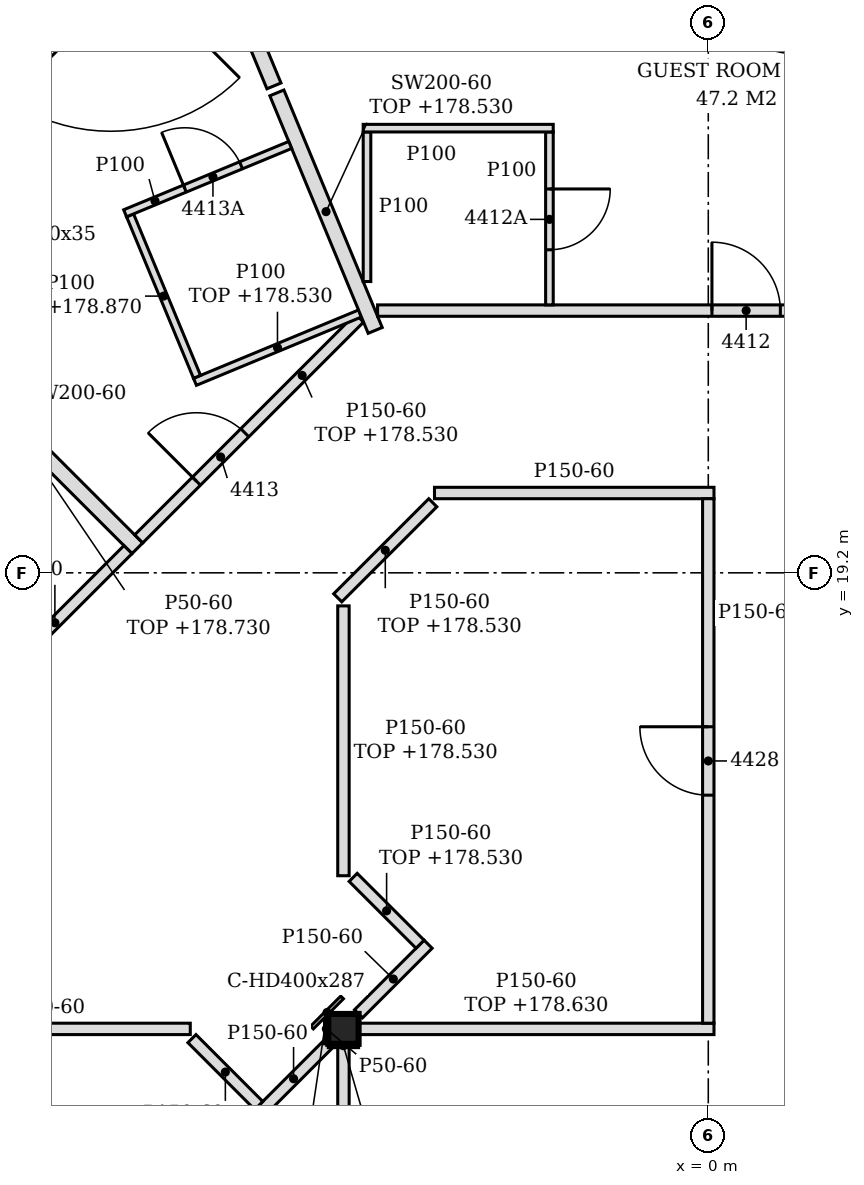
"""IFC4 building model, lengths in metres.
Left out: names, types, materials, properties, quantities, classifications, styles, units other than length and angle.
Written with IfcOpenShell. Run it as: python <this file> out.ifc"""

import sys

from ifc_helpers import new_model, si_unit, direction, frame, frame_2d, origin, origin_2d, place, context, subcontext, project, spatial, polyline, rectangle, i_section, outline, extrude, element, fill, save


model = new_model("IFC4")
c1 = context("Model", 3, precision=1e-05, world=origin(), true_north=direction((0.0, 1.0)))
c2 = subcontext(c1, "Body", "Model", "MODEL_VIEW")
j1 = project(units=[si_unit("LENGTHUNIT", "METRE"), si_unit("PLANEANGLEUNIT", "RADIAN")], contexts=[c1])
p1 = place(None, origin())
s1 = spatial("IfcSite", under=j1, at=p1, CompositionType="ELEMENT")
p2 = place(p1, origin())
s2 = spatial("IfcBuilding", under=s1, at=p2, CompositionType="ELEMENT")
p3 = place(p2, frame((0.0, 0.0, 175.8)))
s3 = spatial("IfcBuildingStorey", under=s2, at=p3, CompositionType="ELEMENT", Elevation=175.8)
p4 = place(p3, frame((-4.8, 13.2, -0.15), z_axis=(0.0, 0.0, 1.0), x_axis=(1.0, 0.0, 0.0)))
e1 = element("IfcColumn", 1, at=p4, inside=s3, PredefinedType="COLUMN", context=c2, shape_type="SweptSolid", body=[
    extrude(i_section(OverallWidth=0.399, OverallDepth=0.393, WebThickness=0.023, FlangeThickness=0.037, FilletRadius=0.015, at=origin_2d()), origin(), (0.0, 0.0, 1.0), 3.6),
])
p5 = place(p3, frame((-6.9, 28.372, 0.0), z_axis=(0.0, 0.0, 1.0), x_axis=(-0.707106781187, -0.707106781187, 0.0)))
e2 = element("IfcWall", 2, at=p5, inside=s3, PredefinedType="NOTDEFINED", context=c2, shape_type="SweptSolid", body=[
    extrude(rectangle(XDim=3.962, YDim=0.2, at=frame_2d((1.981, 0.0))), origin(), (0.0, 0.0, 1.0), 3.45),
])
p6 = place(p5, frame((1.362, 0.0, 0.0)))
e3 = element("IfcOpeningElement", 3, at=p6, cuts=e2, PredefinedType="OPENING", context=c2, shape_type="SweptSolid", body=[
    extrude(rectangle(XDim=2.4, YDim=2.4, at=frame_2d((1.2, 1.2))), frame((0.0, 0.11, 0.0), z_axis=(0.0, -1.0, 0.0), x_axis=(1.0, 0.0, 0.0)), (0.0, 0.0, 1.0), 0.22),
])
p7 = place(p3, frame((-4.8, 2.596, 0.0), z_axis=(0.0, 0.0, 1.0), x_axis=(0.0, 1.0, 0.0)))
e4 = element("IfcWall", 4, at=p7, inside=s3, PredefinedType="PARTITIONING", context=c2, shape_type="SweptSolid", body=[
    extrude(rectangle(XDim=10.407, YDim=0.15, at=frame_2d((5.204, 0.0))), origin(), (0.0, 0.0, 1.0), 2.83),
])
p8 = place(p7, frame((2.954, 0.0, 0.0)))
e5 = element("IfcOpeningElement", 5, at=p8, cuts=e4, PredefinedType="OPENING", context=c2, shape_type="SweptSolid", body=[
    extrude(rectangle(XDim=0.9, YDim=2.1, at=frame_2d((0.45, 1.05))), frame((0.0, 0.085, 0.0), z_axis=(0.0, -1.0, 0.0), x_axis=(1.0, 0.0, 0.0)), (0.0, 0.0, 1.0), 0.17),
])
p9 = place(p3, frame((-5.914, 12.086, 0.0), z_axis=(0.0, 0.0, 1.0), x_axis=(0.707106781187, 0.707106781187, 0.0)))
e6 = element("IfcWall", 6, at=p9, inside=s3, PredefinedType="PARTITIONING", context=c2, shape_type="SweptSolid", body=[
    extrude(rectangle(XDim=1.295, YDim=0.15, at=frame_2d((0.648, 0.0))), origin(), (0.0, 0.0, 1.0), 3.45),
])
p10 = place(p3, frame((-5.914, 12.192, 0.0), z_axis=(0.0, 0.0, 1.0), x_axis=(-0.706812296552, 0.70740114323, 0.0)))
e7 = element("IfcWall", 7, at=p10, inside=s3, PredefinedType="PARTITIONING", context=c2, shape_type="SweptSolid", body=[
    extrude(rectangle(XDim=1.244, YDim=0.15, at=frame_2d((0.622, 0.0))), origin(), (0.0, 0.0, 1.0), 3.45),
])
p11 = place(p3, frame((-10.652, 13.2, 0.0), z_axis=(0.0, 0.0, 1.0), x_axis=(1.0, 0.0, 0.0)))
e8 = element("IfcWall", 8, at=p11, inside=s3, PredefinedType="PARTITIONING", context=c2, shape_type="SweptSolid", body=[
    extrude(rectangle(XDim=3.837, YDim=0.15, at=frame_2d((1.918, 0.0))), origin(), (0.0, 0.0, 1.0), 3.45),
])
p12 = place(p3, frame((-4.601, 13.2, 0.0), z_axis=(0.0, 0.0, 1.0), x_axis=(1.0, 0.0, 0.0)))
e9 = element("IfcWall", 9, at=p12, inside=s3, PredefinedType="PARTITIONING", context=c2, shape_type="SweptSolid", body=[
    extrude(rectangle(XDim=4.676, YDim=0.15, at=frame_2d((2.338, 0.0))), origin(), (0.0, 0.0, 1.0), 2.83),
])
p13 = place(p3, frame((0.0, 13.275, 0.0), z_axis=(0.0, 0.0, 1.0), x_axis=(0.0, 1.0, 0.0)))
e10 = element("IfcWall", 10, at=p13, inside=s3, PredefinedType="PARTITIONING", context=c2, shape_type="SweptSolid", body=[
    extrude(outline(polyline([(0.0, 0.0), (6.9, 0.0), (6.9, 3.45), (5.43, 3.45), (5.428, 2.88), (5.22, 2.88), (5.218, 3.45), (0.075, 3.45), (0.073, 2.83), (0.0, 2.83), (0.0, 0.0)])), frame((0.0, 0.075, 0.0), z_axis=(0.0, -1.0, 0.0), x_axis=(1.0, 0.0, 0.0)), (0.0, 0.0, 1.0), 0.15),
])
p14 = place(p13, frame((3.0, 0.0, 0.0)))
e11 = element("IfcOpeningElement", 11, at=p14, cuts=e10, PredefinedType="OPENING", context=c2, shape_type="SweptSolid", body=[
    extrude(rectangle(XDim=0.9, YDim=2.1, at=frame_2d((0.45, 1.05))), frame((0.0, 0.085, 0.0), z_axis=(0.0, -1.0, 0.0), x_axis=(1.0, 0.0, 0.0)), (0.0, 0.0, 1.0), 0.17),
])
p15 = place(p3, frame((-4.602, 13.398, 0.0), z_axis=(0.0, 0.0, 1.0), x_axis=(0.707106781187, 0.707106781187, 0.0)))
e12 = element("IfcWall", 12, at=p15, inside=s3, PredefinedType="PARTITIONING", context=c2, shape_type="SweptSolid", body=[
    extrude(rectangle(XDim=1.296, YDim=0.15, at=frame_2d((0.648, 0.0))), origin(), (0.0, 0.0, 1.0), 3.45),
])
p16 = place(p3, frame((-3.792, 14.314, 0.0), z_axis=(0.0, 0.0, 1.0), x_axis=(-0.707499182195, 0.706714162298, 0.0)))
e13 = element("IfcWall", 13, at=p16, inside=s3, PredefinedType="PARTITIONING", context=c2, shape_type="SweptSolid", body=[
    extrude(rectangle(XDim=1.244, YDim=0.15, at=frame_2d((0.622, 0.0))), origin(), (0.0, 0.0, 1.0), 2.73),
])
p17 = place(p3, frame((-12.117, 15.022, 0.0), z_axis=(0.0, 0.0, 1.0), x_axis=(0.70701050414, 0.707203045127, 0.0)))
e14 = element("IfcWall", 14, at=p17, inside=s3, PredefinedType="PARTITIONING", context=c2, shape_type="SweptSolid", body=[
    extrude(rectangle(XDim=6.34, YDim=0.15, at=frame_2d((3.17, 0.0))), origin(), (0.0, 0.0, 1.0), 2.93),
])
p18 = place(p17, frame((2.72, 0.0, 0.0)))
e15 = element("IfcOpeningElement", 15, at=p18, cuts=e14, PredefinedType="OPENING", context=c2, shape_type="SweptSolid", body=[
    extrude(rectangle(XDim=0.9, YDim=2.1, at=frame_2d((0.45, 1.05))), frame((0.0, 0.085, 0.0), z_axis=(0.0, -1.0, 0.0), x_axis=(1.0, 0.0, 0.0)), (0.0, 0.0, 1.0), 0.17),
])
p19 = place(p3, frame((-4.8, 15.215, 0.0), z_axis=(0.0, 0.0, 1.0), x_axis=(0.0, 1.0, 0.0)))
e16 = element("IfcWall", 16, at=p19, inside=s3, PredefinedType="PARTITIONING", context=c2, shape_type="SweptSolid", body=[
    extrude(rectangle(XDim=3.55, YDim=0.15, at=frame_2d((1.775, 0.0))), origin(), (0.0, 0.0, 1.0), 2.73),
])
p20 = place(p3, frame((-4.875, 18.871, 0.0), z_axis=(0.0, 0.0, 1.0), x_axis=(0.707175784043, 0.707037771595, 0.0)))
e17 = element("IfcWall", 17, at=p20, inside=s3, PredefinedType="PARTITIONING", context=c2, shape_type="SweptSolid", body=[
    extrude(rectangle(XDim=1.769, YDim=0.15, at=frame_2d((0.885, 0.0))), origin(), (0.0, 0.0, 1.0), 2.73),
])
p21 = place(p3, frame((-7.511, 19.523, 0.0), z_axis=(0.0, 0.0, 1.0), x_axis=(-0.707167526582, 0.707046030572, 0.0)))
e18 = element("IfcWall", 18, at=p21, inside=s3, PredefinedType="PARTITIONING", context=c2, shape_type="SweptSolid", body=[
    extrude(rectangle(XDim=4.019, YDim=0.2, at=frame_2d((2.009, 0.0))), origin(), (0.0, 0.0, 1.0), 3.45),
])
p22 = place(p3, frame((-7.493, 19.647, 0.0), z_axis=(0.0, 0.0, 1.0), x_axis=(0.707136494677, 0.707077066448, 0.0)))
e19 = element("IfcWall", 19, at=p22, inside=s3, PredefinedType="PARTITIONING", context=c2, shape_type="SweptSolid", body=[
    extrude(rectangle(XDim=4.108, YDim=0.15, at=frame_2d((2.054, 0.0))), origin(), (0.0, 0.0, 1.0), 2.73),
])
p23 = place(p22, frame((1.074, 0.0, 0.0)))
e20 = element("IfcOpeningElement", 20, at=p23, cuts=e19, PredefinedType="OPENING", context=c2, shape_type="SweptSolid", body=[
    extrude(rectangle(XDim=0.9, YDim=2.1, at=frame_2d((0.45, 1.05))), frame((0.0, 0.085, 0.0), z_axis=(0.0, -1.0, 0.0), x_axis=(1.0, 0.0, 0.0)), (0.0, 0.0, 1.0), 0.17),
])
p24 = place(p3, frame((-3.602, 20.25, 0.0), z_axis=(0.0, 0.0, 1.0), x_axis=(1.0, 0.0, 0.0)))
e21 = element("IfcWall", 21, at=p24, inside=s3, PredefinedType="PARTITIONING", context=c2, shape_type="SweptSolid", body=[
    extrude(rectangle(XDim=3.677, YDim=0.15, at=frame_2d((1.838, 0.0))), origin(), (0.0, 0.0, 1.0), 3.45),
])
p25 = place(p3, frame((-6.753, 21.713, 0.0), z_axis=(0.0, 0.0, 1.0), x_axis=(0.923907921622, 0.382614887798, 0.0)))
e22 = element("IfcWall", 22, at=p25, inside=s3, PredefinedType="PARTITIONING", context=c2, shape_type="SweptSolid", body=[
    extrude(rectangle(XDim=2.349, YDim=0.1, at=frame_2d((1.175, 0.0))), origin(), (0.0, 0.0, 1.0), 2.73),
])
p26 = place(p3, frame((-6.726, 21.778, 0.0), z_axis=(0.0, 0.0, 1.0), x_axis=(-0.382911179632, 0.923785163614, 0.0)))
e23 = element("IfcWall", 23, at=p26, inside=s3, PredefinedType="PARTITIONING", context=c2, shape_type="SweptSolid", body=[
    extrude(rectangle(XDim=2.3, YDim=0.1, at=frame_2d((1.15, 0.0))), origin(), (0.0, 0.0, 1.0), 3.07),
])
p27 = place(p3, frame((-4.382, 22.389, 0.0), z_axis=(0.0, 0.0, 1.0), x_axis=(-0.382553705703, 0.923933256384, 0.0)))
e24 = element("IfcWall", 24, at=p27, inside=s3, PredefinedType="PARTITIONING", context=c2, shape_type="SweptSolid", body=[
    extrude(rectangle(XDim=3.382, YDim=0.2, at=frame_2d((1.691, 0.0))), origin(), (0.0, 0.0, 1.0), 2.73),
])
p28 = place(p3, frame((-4.351, 22.65, 0.0), z_axis=(0.0, 0.0, 1.0), x_axis=(1.0, 0.0, 0.0)))
e25 = element("IfcWall", 25, at=p28, inside=s3, PredefinedType="PARTITIONING", context=c2, shape_type="SweptSolid", body=[
    extrude(outline(polyline([(0.0, 0.0), (23.551, 0.0), (23.552, 2.73), (23.401, 2.73), (23.399, 3.45), (11.701, 3.45), (11.699, 2.73), (11.401, 2.73), (11.399, 3.45), (0.0, 3.45), (0.0, 0.0)])), frame((0.0, 0.075, 0.0), z_axis=(0.0, -1.0, 0.0), x_axis=(1.0, 0.0, 0.0)), (0.0, 0.0, 1.0), 0.15),
])
p29 = place(p28, frame((20.99, 0.0, 0.0)))
e26 = element("IfcOpeningElement", 26, at=p29, cuts=e25, PredefinedType="OPENING", context=c2, shape_type="SweptSolid", body=[
    extrude(rectangle(XDim=0.9, YDim=2.1, at=frame_2d((0.45, 1.05))), frame((0.0, 0.085, 0.0), z_axis=(0.0, -1.0, 0.0), x_axis=(1.0, 0.0, 0.0)), (0.0, 0.0, 1.0), 0.17),
])
p30 = place(p28, frame((11.664, 0.0, 0.0)))
e27 = element("IfcOpeningElement", 27, at=p30, cuts=e25, PredefinedType="OPENING", context=c2, shape_type="SweptSolid", body=[
    extrude(rectangle(XDim=0.9, YDim=2.1, at=frame_2d((0.45, 1.05))), frame((0.0, 0.085, 0.0), z_axis=(0.0, -1.0, 0.0), x_axis=(1.0, 0.0, 0.0)), (0.0, 0.0, 1.0), 0.17),
])
p31 = place(p28, frame((4.399, 0.0, 0.0)))
e28 = element("IfcOpeningElement", 28, at=p31, cuts=e25, PredefinedType="OPENING", context=c2, shape_type="SweptSolid", body=[
    extrude(rectangle(XDim=0.9, YDim=2.1, at=frame_2d((0.45, 1.05))), frame((0.0, 0.085, 0.0), z_axis=(0.0, -1.0, 0.0), x_axis=(1.0, 0.0, 0.0)), (0.0, 0.0, 1.0), 0.17),
])
p32 = place(p3, frame((-2.09, 22.725, 0.0), z_axis=(0.0, 0.0, 1.0), x_axis=(0.0, 1.0, 0.0)))
e29 = element("IfcWall", 29, at=p32, inside=s3, PredefinedType="PARTITIONING", context=c2, shape_type="SweptSolid", body=[
    extrude(outline(polyline([(0.0, 0.0), (2.275, 0.0), (2.275, 3.45), (0.78, 3.45), (0.778, 2.88), (0.57, 2.88), (0.568, 3.45), (0.0, 3.45), (0.0, 0.0)])), frame((0.0, 0.05, 0.0), z_axis=(0.0, -1.0, 0.0), x_axis=(1.0, 0.0, 0.0)), (0.0, 0.0, 1.0), 0.1),
])
p33 = place(p32, frame((0.725, 0.0, 0.0)))
e30 = element("IfcOpeningElement", 30, at=p33, cuts=e29, PredefinedType="OPENING", context=c2, shape_type="SweptSolid", body=[
    extrude(rectangle(XDim=0.8, YDim=2.1, at=frame_2d((0.4, 1.05))), frame((0.0, 0.06, 0.0), z_axis=(0.0, -1.0, 0.0), x_axis=(1.0, 0.0, 0.0)), (0.0, 0.0, 1.0), 0.12),
])
p34 = place(p3, frame((-4.49, 23.032, 0.0), z_axis=(0.0, 0.0, 1.0), x_axis=(0.0, 1.0, 0.0)))
e31 = element("IfcWall", 31, at=p34, inside=s3, PredefinedType="PARTITIONING", context=c2, shape_type="SweptSolid", body=[
    extrude(outline(polyline([(0.0, 0.0), (1.968, 0.0), (1.968, 3.45), (0.473, 3.45), (0.471, 2.88), (0.263, 2.88), (0.261, 3.45), (0.0, 3.45), (0.0, 0.0)])), frame((0.0, 0.05, 0.0), z_axis=(0.0, -1.0, 0.0), x_axis=(1.0, 0.0, 0.0)), (0.0, 0.0, 1.0), 0.1),
])
p35 = place(p3, frame((-7.672, 23.93, 0.0), z_axis=(0.0, 0.0, 1.0), x_axis=(0.923968736757, 0.382468003231, 0.0)))
e32 = element("IfcWall", 32, at=p35, inside=s3, PredefinedType="PARTITIONING", context=c2, shape_type="SweptSolid", body=[
    extrude(rectangle(XDim=2.35, YDim=0.1, at=frame_2d((1.175, 0.0))), origin(), (0.0, 0.0, 1.0), 3.45),
])
p36 = place(p35, frame((0.851, 0.0, 0.0)))
e33 = element("IfcOpeningElement", 33, at=p36, cuts=e32, PredefinedType="OPENING", context=c2, shape_type="SweptSolid", body=[
    extrude(rectangle(XDim=0.8, YDim=2.1, at=frame_2d((0.4, 1.05))), frame((0.0, 0.06, 0.0), z_axis=(0.0, -1.0, 0.0), x_axis=(1.0, 0.0, 0.0)), (0.0, 0.0, 1.0), 0.12),
])
p37 = place(p3, frame((-4.54, 25.05, 0.0), z_axis=(0.0, 0.0, 1.0), x_axis=(1.0, 0.0, 0.0)))
e34 = element("IfcWall", 34, at=p37, inside=s3, PredefinedType="PARTITIONING", context=c2, shape_type="SweptSolid", body=[
    extrude(rectangle(XDim=2.5, YDim=0.1, at=frame_2d((1.25, 0.0))), origin(), (0.0, 0.0, 1.0), 3.45),
])
p38 = place(p3, frame((-5.714, 25.606, 0.0), z_axis=(0.0, 0.0, 1.0), x_axis=(-0.38281572922, 0.923824722261, 0.0)))
e35 = element("IfcWall", 35, at=p38, inside=s3, PredefinedType="PARTITIONING", context=c2, shape_type="SweptSolid", body=[
    extrude(rectangle(XDim=1.224, YDim=0.2, at=frame_2d((0.612, 0.0))), origin(), (0.0, 0.0, 1.0), 3.45),
])
p39 = place(p3, frame((-5.024, 13.003, 0.0), z_axis=(0.0, 0.0, 1.0), x_axis=(0.0, 1.0, 0.0)))
e36 = element("IfcWall", 36, at=p39, inside=s3, PredefinedType="PARTITIONING", context=c2, shape_type="SweptSolid", body=[
    extrude(rectangle(XDim=0.393, YDim=0.05, at=frame_2d((0.197, 0.0))), origin(), (0.0, 0.0, 1.0), 3.45),
])
p40 = place(p3, frame((-5.214, 13.218, 0.0), z_axis=(0.0, 0.0, 1.0), x_axis=(0.707106781187, 0.707106781187, 0.0)))
e37 = element("IfcWall", 37, at=p40, inside=s3, PredefinedType="PARTITIONING", context=c2, shape_type="SweptSolid", body=[
    extrude(rectangle(XDim=0.56, YDim=0.05, at=frame_2d((0.28, 0.0))), origin(), (0.0, 0.0, 1.0), 2.73),
])
p41 = place(p3, frame((-5.0, 12.979, 0.0), z_axis=(0.0, 0.0, 1.0), x_axis=(1.0, 0.0, 0.0)))
e38 = element("IfcWall", 38, at=p41, inside=s3, PredefinedType="PARTITIONING", context=c2, shape_type="SweptSolid", body=[
    extrude(rectangle(XDim=0.399, YDim=0.05, at=frame_2d((0.199, 0.0))), origin(), (0.0, 0.0, 1.0), 2.83),
])
p42 = place(p6, origin())
e39 = element("IfcDoor", 39, at=p42, inside=s3, OperationType="SINGLE_SWING_LEFT", PredefinedType="DOOR", context=c2, shape_type="SweptSolid", body=[
    extrude(rectangle(XDim=2.4, YDim=2.4, at=frame_2d((1.2, 1.2))), frame((0.0, 0.025, 0.0), z_axis=(0.0, -1.0, 0.0), x_axis=(1.0, 0.0, 0.0)), (0.0, 0.0, 1.0), 0.05),
])
fill(e3, e39)
p43 = place(p31, origin())
e40 = element("IfcDoor", 40, at=p43, inside=s3, OperationType="SINGLE_SWING_LEFT", PredefinedType="DOOR", context=c2, shape_type="SweptSolid", body=[
    extrude(rectangle(XDim=0.9, YDim=2.1, at=frame_2d((0.45, 1.05))), frame((0.0, 0.025, 0.0), z_axis=(0.0, -1.0, 0.0), x_axis=(1.0, 0.0, 0.0)), (0.0, 0.0, 1.0), 0.05),
])
fill(e28, e40)
p44 = place(p33, frame((0.8, 0.0, 0.0), z_axis=(0.0, 0.0, 1.0), x_axis=(-1.0, 0.0, 0.0)))
e41 = element("IfcDoor", 41, at=p44, inside=s3, OperationType="SINGLE_SWING_LEFT", PredefinedType="DOOR", context=c2, shape_type="SweptSolid", body=[
    extrude(rectangle(XDim=0.8, YDim=2.1, at=frame_2d((0.4, 1.05))), frame((0.0, 0.025, 0.0), z_axis=(0.0, -1.0, 0.0), x_axis=(1.0, 0.0, 0.0)), (0.0, 0.0, 1.0), 0.05),
])
fill(e30, e41)
p45 = place(p23, origin())
e42 = element("IfcDoor", 42, at=p45, inside=s3, OperationType="SINGLE_SWING_LEFT", PredefinedType="DOOR", context=c2, shape_type="SweptSolid", body=[
    extrude(rectangle(XDim=0.9, YDim=2.1, at=frame_2d((0.45, 1.05))), frame((0.0, 0.025, 0.0), z_axis=(0.0, -1.0, 0.0), x_axis=(1.0, 0.0, 0.0)), (0.0, 0.0, 1.0), 0.05),
])
fill(e20, e42)
p46 = place(p36, origin())
e43 = element("IfcDoor", 43, at=p46, inside=s3, OperationType="SINGLE_SWING_LEFT", PredefinedType="DOOR", context=c2, shape_type="SweptSolid", body=[
    extrude(rectangle(XDim=0.8, YDim=2.1, at=frame_2d((0.4, 1.05))), frame((0.0, 0.025, 0.0), z_axis=(0.0, -1.0, 0.0), x_axis=(1.0, 0.0, 0.0)), (0.0, 0.0, 1.0), 0.05),
])
fill(e33, e43)
p47 = place(p14, origin())
e44 = element("IfcDoor", 44, at=p47, inside=s3, OperationType="SINGLE_SWING_RIGHT", PredefinedType="DOOR", context=c2, shape_type="SweptSolid", body=[
    extrude(rectangle(XDim=0.9, YDim=2.1, at=frame_2d((0.45, 1.05))), frame((0.0, 0.025, 0.0), z_axis=(0.0, -1.0, 0.0), x_axis=(1.0, 0.0, 0.0)), (0.0, 0.0, 1.0), 0.05),
])
fill(e11, e44)
save(model, sys.argv[1])
